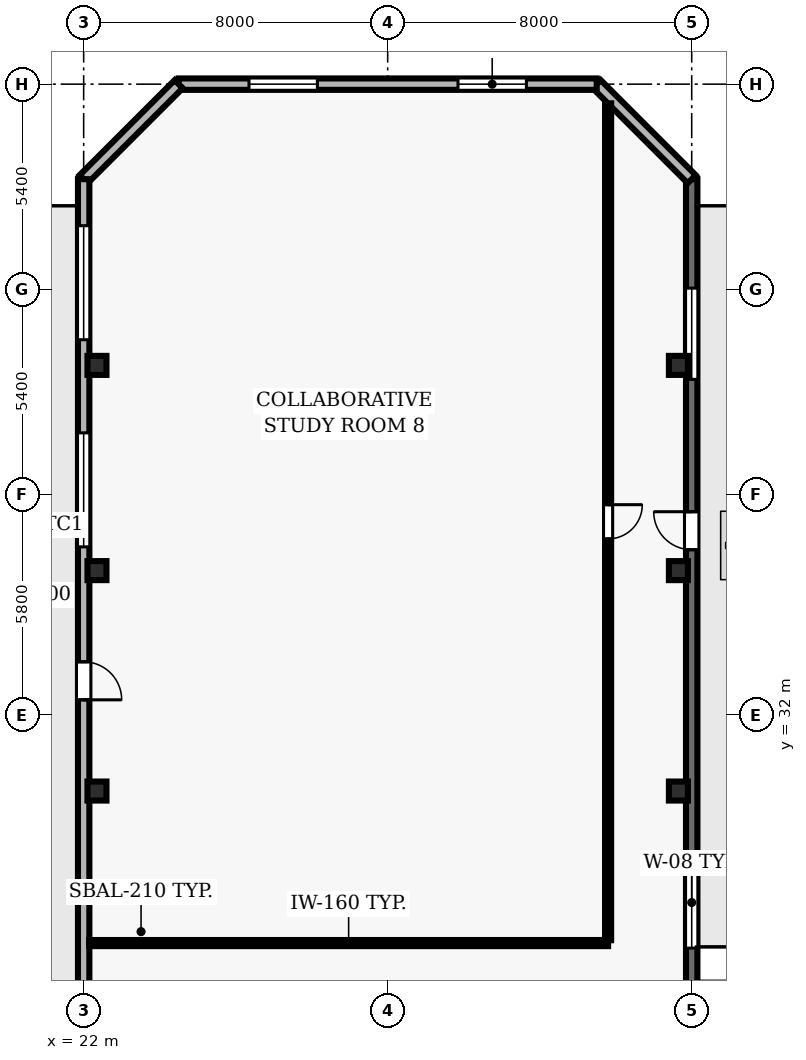
"""IFC4 building model, lengths in metres.
Left out: names, types, materials, properties, quantities, classifications, styles, units other than length and angle.
Written with IfcOpenShell. Run it as: python <this file> out.ifc"""

import sys

from ifc_helpers import new_model, si_unit, direction, frame, frame_2d, origin, origin_2d, place, context, subcontext, project, spatial, rectangle, hollow_rectangle, extrude, element, fill, save


model = new_model("IFC4")
c1 = context("Model", 3, precision=1e-05, world=origin(), true_north=direction((0.0, 1.0)))
c2 = subcontext(c1, "Body", "Model", "MODEL_VIEW")
j1 = project(units=[si_unit("LENGTHUNIT", "METRE"), si_unit("PLANEANGLEUNIT", "RADIAN")], contexts=[c1])
p1 = place(None, origin())
s1 = spatial("IfcSite", under=j1, at=p1, CompositionType="ELEMENT")
p2 = place(p1, origin())
s2 = spatial("IfcBuilding", under=s1, at=p2, CompositionType="ELEMENT")
p3 = place(p2, frame((0.0, 0.0, 146.3)))
s3 = spatial("IfcBuildingStorey", under=s2, at=p3, CompositionType="ELEMENT", Elevation=146.3)
for number, where, z_axis, x_axis in (
    (1, (22.35, 30.0, 0.0), (0.0, 0.0, 1.0), (1.0, 0.0, 0.0)),
    (2, (37.65, 30.0, 0.0), (0.0, 0.0, 1.0), (1.0, 0.0, 0.0)),
    (3, (22.35, 35.8, 0.0), (0.0, 0.0, 1.0), (1.0, 0.0, 0.0)),
    (4, (37.65, 35.8, 0.0), (0.0, 0.0, 1.0), (1.0, 0.0, 0.0)),
    (5, (22.35, 41.2, 0.0), (0.0, 0.0, 1.0), (1.0, 0.0, 0.0)),
    (6, (37.65, 41.2, 0.0), (0.0, 0.0, 1.0), (1.0, 0.0, 0.0)),
):
    element("IfcColumn", number, at=place(p3, frame(where, z_axis=z_axis, x_axis=x_axis)), inside=s3, PredefinedType="COLUMN", context=c2, shape_type="SweptSolid", body=[
        extrude(hollow_rectangle(XDim=0.5, YDim=0.5, WallThickness=0.025, at=origin_2d()), origin(), (0.0, 0.0, 1.0), 3.9),
    ])
p4 = place(p3, frame((44.846, 25.0, 0.0), z_axis=(0.0, 0.0, 1.0), x_axis=(-0.989499256162, -0.144537960602, 0.0)))
e7 = element("IfcWall", 7, at=p4, inside=s3, PredefinedType="SOLIDWALL", context=c2, shape_type="SweptSolid", body=[
    extrude(rectangle(XDim=6.919, YDim=0.3, at=frame_2d((3.459, 0.0))), origin(), (0.0, 0.0, 1.0), 3.69),
])
p5 = place(p4, frame((2.523, 0.0, 0.9)))
e8 = element("IfcOpeningElement", 8, at=p5, cuts=e7, PredefinedType="OPENING", context=c2, shape_type="SweptSolid", body=[
    extrude(rectangle(XDim=1.8, YDim=1.8, at=frame_2d((0.9, 0.9))), frame((0.0, 0.16, 0.0), z_axis=(0.0, -1.0, 0.0), x_axis=(1.0, 0.0, 0.0)), (0.0, 0.0, 1.0), 0.32),
])
p6 = place(p3, frame((38.0, 24.0, 0.0), z_axis=(0.0, 0.0, 1.0), x_axis=(0.0, 1.0, 0.0)))
e9 = element("IfcWall", 9, at=p6, inside=s3, PredefinedType="SOLIDWALL", context=c2, shape_type="SweptSolid", body=[
    extrude(rectangle(XDim=22.1, YDim=0.3, at=frame_2d((11.05, 0.0))), origin(), (0.0, 0.0, 1.0), 3.69),
])
p7 = place(p6, frame((12.35, 0.0, 0.0)))
e10 = element("IfcOpeningElement", 10, at=p7, cuts=e9, PredefinedType="OPENING", context=c2, shape_type="SweptSolid", body=[
    extrude(rectangle(XDim=1.0, YDim=2.2, at=frame_2d((0.5, 1.1))), frame((0.0, 0.16, 0.0), z_axis=(0.0, -1.0, 0.0), x_axis=(1.0, 0.0, 0.0)), (0.0, 0.0, 1.0), 0.32),
])
p8 = place(p6, frame((1.867, 0.0, 0.9)))
e11 = element("IfcOpeningElement", 11, at=p8, cuts=e9, PredefinedType="OPENING", context=c2, shape_type="SweptSolid", body=[
    extrude(rectangle(XDim=2.4, YDim=1.8, at=frame_2d((1.2, 0.9))), frame((0.0, 0.16, 0.0), z_axis=(0.0, -1.0, 0.0), x_axis=(1.0, 0.0, 0.0)), (0.0, 0.0, 1.0), 0.32),
])
p9 = place(p6, frame((16.833, 0.0, 0.9)))
e12 = element("IfcOpeningElement", 12, at=p9, cuts=e9, PredefinedType="OPENING", context=c2, shape_type="SweptSolid", body=[
    extrude(rectangle(XDim=2.4, YDim=1.8, at=frame_2d((1.2, 0.9))), frame((0.0, 0.16, 0.0), z_axis=(0.0, -1.0, 0.0), x_axis=(1.0, 0.0, 0.0)), (0.0, 0.0, 1.0), 0.32),
])
p10 = place(p3, frame((38.0, 46.1, 0.0), z_axis=(0.0, 0.0, 1.0), x_axis=(-0.707106781187, 0.707106781187, 0.0)))
e13 = element("IfcWall", 13, at=p10, inside=s3, PredefinedType="SOLIDWALL", context=c2, shape_type="SweptSolid", body=[
    extrude(rectangle(XDim=3.536, YDim=0.3, at=frame_2d((1.768, 0.0))), origin(), (0.0, 0.0, 1.0), 3.69),
])
p11 = place(p3, frame((35.5, 48.6, 0.0), z_axis=(0.0, 0.0, 1.0), x_axis=(-1.0, 0.0, 0.0)))
e14 = element("IfcWall", 14, at=p11, inside=s3, PredefinedType="SOLIDWALL", context=c2, shape_type="SweptSolid", body=[
    extrude(rectangle(XDim=11.0, YDim=0.3, at=frame_2d((5.5, 0.0))), origin(), (0.0, 0.0, 1.0), 3.69),
])
p12 = place(p11, frame((1.85, 0.0, 0.9)))
e15 = element("IfcOpeningElement", 15, at=p12, cuts=e14, PredefinedType="OPENING", context=c2, shape_type="SweptSolid", body=[
    extrude(rectangle(XDim=1.8, YDim=2.2, at=frame_2d((0.9, 1.1))), frame((0.0, 0.16, 0.0), z_axis=(0.0, -1.0, 0.0), x_axis=(1.0, 0.0, 0.0)), (0.0, 0.0, 1.0), 0.32),
])
p13 = place(p11, frame((7.35, 0.0, 0.9)))
e16 = element("IfcOpeningElement", 16, at=p13, cuts=e14, PredefinedType="OPENING", context=c2, shape_type="SweptSolid", body=[
    extrude(rectangle(XDim=1.8, YDim=2.2, at=frame_2d((0.9, 1.1))), frame((0.0, 0.16, 0.0), z_axis=(0.0, -1.0, 0.0), x_axis=(1.0, 0.0, 0.0)), (0.0, 0.0, 1.0), 0.32),
])
p14 = place(p3, frame((24.5, 48.6, 0.0), z_axis=(0.0, 0.0, 1.0), x_axis=(-0.707106781187, -0.707106781187, 0.0)))
e17 = element("IfcWall", 17, at=p14, inside=s3, PredefinedType="SOLIDWALL", context=c2, shape_type="SweptSolid", body=[
    extrude(rectangle(XDim=3.536, YDim=0.3, at=frame_2d((1.768, 0.0))), origin(), (0.0, 0.0, 1.0), 3.69),
])
p15 = place(p3, frame((22.0, 46.1, 0.0), z_axis=(0.0, 0.0, 1.0), x_axis=(0.0, -1.0, 0.0)))
e18 = element("IfcWall", 18, at=p15, inside=s3, PredefinedType="SOLIDWALL", context=c2, shape_type="SweptSolid", body=[
    extrude(rectangle(XDim=43.6, YDim=0.3, at=frame_2d((21.8, 0.0))), origin(), (0.0, 0.0, 1.0), 3.69),
])
p16 = place(p15, frame((12.7, 0.0, 0.0)))
e19 = element("IfcOpeningElement", 19, at=p16, cuts=e18, PredefinedType="OPENING", context=c2, shape_type="SweptSolid", body=[
    extrude(rectangle(XDim=1.0, YDim=2.2, at=frame_2d((0.5, 1.1))), frame((0.0, 0.16, 0.0), z_axis=(0.0, -1.0, 0.0), x_axis=(1.0, 0.0, 0.0)), (0.0, 0.0, 1.0), 0.32),
])
p17 = place(p15, frame((1.225, 0.0, 0.9)))
e20 = element("IfcOpeningElement", 20, at=p17, cuts=e18, PredefinedType="OPENING", context=c2, shape_type="SweptSolid", body=[
    extrude(rectangle(XDim=3.0, YDim=2.2, at=frame_2d((1.5, 1.1))), frame((0.0, 0.16, 0.0), z_axis=(0.0, -1.0, 0.0), x_axis=(1.0, 0.0, 0.0)), (0.0, 0.0, 1.0), 0.32),
])
p18 = place(p15, frame((6.675, 0.0, 0.9)))
e21 = element("IfcOpeningElement", 21, at=p18, cuts=e18, PredefinedType="OPENING", context=c2, shape_type="SweptSolid", body=[
    extrude(rectangle(XDim=3.0, YDim=2.2, at=frame_2d((1.5, 1.1))), frame((0.0, 0.16, 0.0), z_axis=(0.0, -1.0, 0.0), x_axis=(1.0, 0.0, 0.0)), (0.0, 0.0, 1.0), 0.32),
])
p19 = place(p15, frame((23.475, 0.0, 0.9)))
e22 = element("IfcOpeningElement", 22, at=p19, cuts=e18, PredefinedType="OPENING", context=c2, shape_type="SweptSolid", body=[
    extrude(rectangle(XDim=3.0, YDim=2.2, at=frame_2d((1.5, 1.1))), frame((0.0, 0.16, 0.0), z_axis=(0.0, -1.0, 0.0), x_axis=(1.0, 0.0, 0.0)), (0.0, 0.0, 1.0), 0.32),
])
p20 = place(p15, frame((33.925, 0.0, 0.9)))
e23 = element("IfcOpeningElement", 23, at=p20, cuts=e18, PredefinedType="OPENING", context=c2, shape_type="SweptSolid", body=[
    extrude(rectangle(XDim=3.0, YDim=2.2, at=frame_2d((1.5, 1.1))), frame((0.0, 0.16, 0.0), z_axis=(0.0, -1.0, 0.0), x_axis=(1.0, 0.0, 0.0)), (0.0, 0.0, 1.0), 0.32),
])
p21 = place(p3, frame((35.8, 26.0, 0.0), z_axis=(0.0, 0.0, 1.0), x_axis=(-1.0, 0.0, 0.0)))
e24 = element("IfcWall", 24, at=p21, inside=s3, PredefinedType="PARTITIONING", context=c2, shape_type="SweptSolid", body=[
    extrude(rectangle(XDim=13.655, YDim=0.16, at=frame_2d((6.828, 0.0))), origin(), (0.0, 0.0, 1.0), 3.69),
])
p22 = place(p3, frame((35.8, 48.095, 0.0), z_axis=(0.0, 0.0, 1.0), x_axis=(0.0, -1.0, 0.0)))
e25 = element("IfcWall", 25, at=p22, inside=s3, PredefinedType="PARTITIONING", context=c2, shape_type="SweptSolid", body=[
    extrude(rectangle(XDim=22.02, YDim=0.16, at=frame_2d((11.01, 0.0))), origin(), (0.0, 0.0, 1.0), 3.69),
])
p23 = place(p22, frame((10.56, 0.0, 0.0)))
e26 = element("IfcOpeningElement", 26, at=p23, cuts=e25, PredefinedType="OPENING", context=c2, shape_type="SweptSolid", body=[
    extrude(rectangle(XDim=0.9, YDim=2.1, at=frame_2d((0.45, 1.05))), frame((0.0, 0.09, 0.0), z_axis=(0.0, -1.0, 0.0), x_axis=(1.0, 0.0, 0.0)), (0.0, 0.0, 1.0), 0.18),
])
p24 = place(p7, origin())
e27 = element("IfcDoor", 27, at=p24, inside=s3, OperationType="SINGLE_SWING_RIGHT", PredefinedType="DOOR", context=c2, shape_type="SweptSolid", body=[
    extrude(rectangle(XDim=1.0, YDim=2.2, at=frame_2d((0.5, 1.1))), frame((0.0, 0.025, 0.0), z_axis=(0.0, -1.0, 0.0), x_axis=(1.0, 0.0, 0.0)), (0.0, 0.0, 1.0), 0.05),
])
fill(e10, e27)
p25 = place(p8, origin())
e28 = element("IfcWindow", 28, at=p25, inside=s3, PartitioningType="SINGLE_PANEL", PredefinedType="WINDOW", context=c2, shape_type="SweptSolid", body=[
    extrude(rectangle(XDim=2.4, YDim=1.8, at=frame_2d((1.2, 0.9))), frame((0.0, 0.03, 0.0), z_axis=(0.0, -1.0, 0.0), x_axis=(1.0, 0.0, 0.0)), (0.0, 0.0, 1.0), 0.06),
])
fill(e11, e28)
p26 = place(p9, origin())
e29 = element("IfcWindow", 29, at=p26, inside=s3, PartitioningType="SINGLE_PANEL", PredefinedType="WINDOW", context=c2, shape_type="SweptSolid", body=[
    extrude(rectangle(XDim=2.4, YDim=1.8, at=frame_2d((1.2, 0.9))), frame((0.0, 0.03, 0.0), z_axis=(0.0, -1.0, 0.0), x_axis=(1.0, 0.0, 0.0)), (0.0, 0.0, 1.0), 0.06),
])
fill(e12, e29)
p27 = place(p12, origin())
e30 = element("IfcWindow", 30, at=p27, inside=s3, PartitioningType="SINGLE_PANEL", PredefinedType="WINDOW", context=c2, shape_type="SweptSolid", body=[
    extrude(rectangle(XDim=1.8, YDim=2.2, at=frame_2d((0.9, 1.1))), frame((0.0, 0.03, 0.0), z_axis=(0.0, -1.0, 0.0), x_axis=(1.0, 0.0, 0.0)), (0.0, 0.0, 1.0), 0.06),
])
fill(e15, e30)
p28 = place(p13, origin())
e31 = element("IfcWindow", 31, at=p28, inside=s3, PartitioningType="SINGLE_PANEL", PredefinedType="WINDOW", context=c2, shape_type="SweptSolid", body=[
    extrude(rectangle(XDim=1.8, YDim=2.2, at=frame_2d((0.9, 1.1))), frame((0.0, 0.03, 0.0), z_axis=(0.0, -1.0, 0.0), x_axis=(1.0, 0.0, 0.0)), (0.0, 0.0, 1.0), 0.06),
])
fill(e16, e31)
p29 = place(p16, origin())
e32 = element("IfcDoor", 32, at=p29, inside=s3, OperationType="SINGLE_SWING_RIGHT", PredefinedType="DOOR", context=c2, shape_type="SweptSolid", body=[
    extrude(rectangle(XDim=1.0, YDim=2.2, at=frame_2d((0.5, 1.1))), frame((0.0, 0.025, 0.0), z_axis=(0.0, -1.0, 0.0), x_axis=(1.0, 0.0, 0.0)), (0.0, 0.0, 1.0), 0.05),
])
fill(e19, e32)
p30 = place(p17, origin())
e33 = element("IfcWindow", 33, at=p30, inside=s3, PartitioningType="SINGLE_PANEL", PredefinedType="WINDOW", context=c2, shape_type="SweptSolid", body=[
    extrude(rectangle(XDim=3.0, YDim=2.2, at=frame_2d((1.5, 1.1))), frame((0.0, 0.03, 0.0), z_axis=(0.0, -1.0, 0.0), x_axis=(1.0, 0.0, 0.0)), (0.0, 0.0, 1.0), 0.06),
])
fill(e20, e33)
p31 = place(p18, origin())
e34 = element("IfcWindow", 34, at=p31, inside=s3, PartitioningType="SINGLE_PANEL", PredefinedType="WINDOW", context=c2, shape_type="SweptSolid", body=[
    extrude(rectangle(XDim=3.0, YDim=2.2, at=frame_2d((1.5, 1.1))), frame((0.0, 0.03, 0.0), z_axis=(0.0, -1.0, 0.0), x_axis=(1.0, 0.0, 0.0)), (0.0, 0.0, 1.0), 0.06),
])
fill(e21, e34)
p32 = place(p23, origin())
e35 = element("IfcDoor", 35, at=p32, inside=s3, OperationType="SINGLE_SWING_LEFT", PredefinedType="DOOR", context=c2, shape_type="SweptSolid", body=[
    extrude(rectangle(XDim=0.9, YDim=2.1, at=frame_2d((0.45, 1.05))), frame((0.0, 0.025, 0.0), z_axis=(0.0, -1.0, 0.0), x_axis=(1.0, 0.0, 0.0)), (0.0, 0.0, 1.0), 0.05),
])
fill(e26, e35)
save(model, sys.argv[1])
